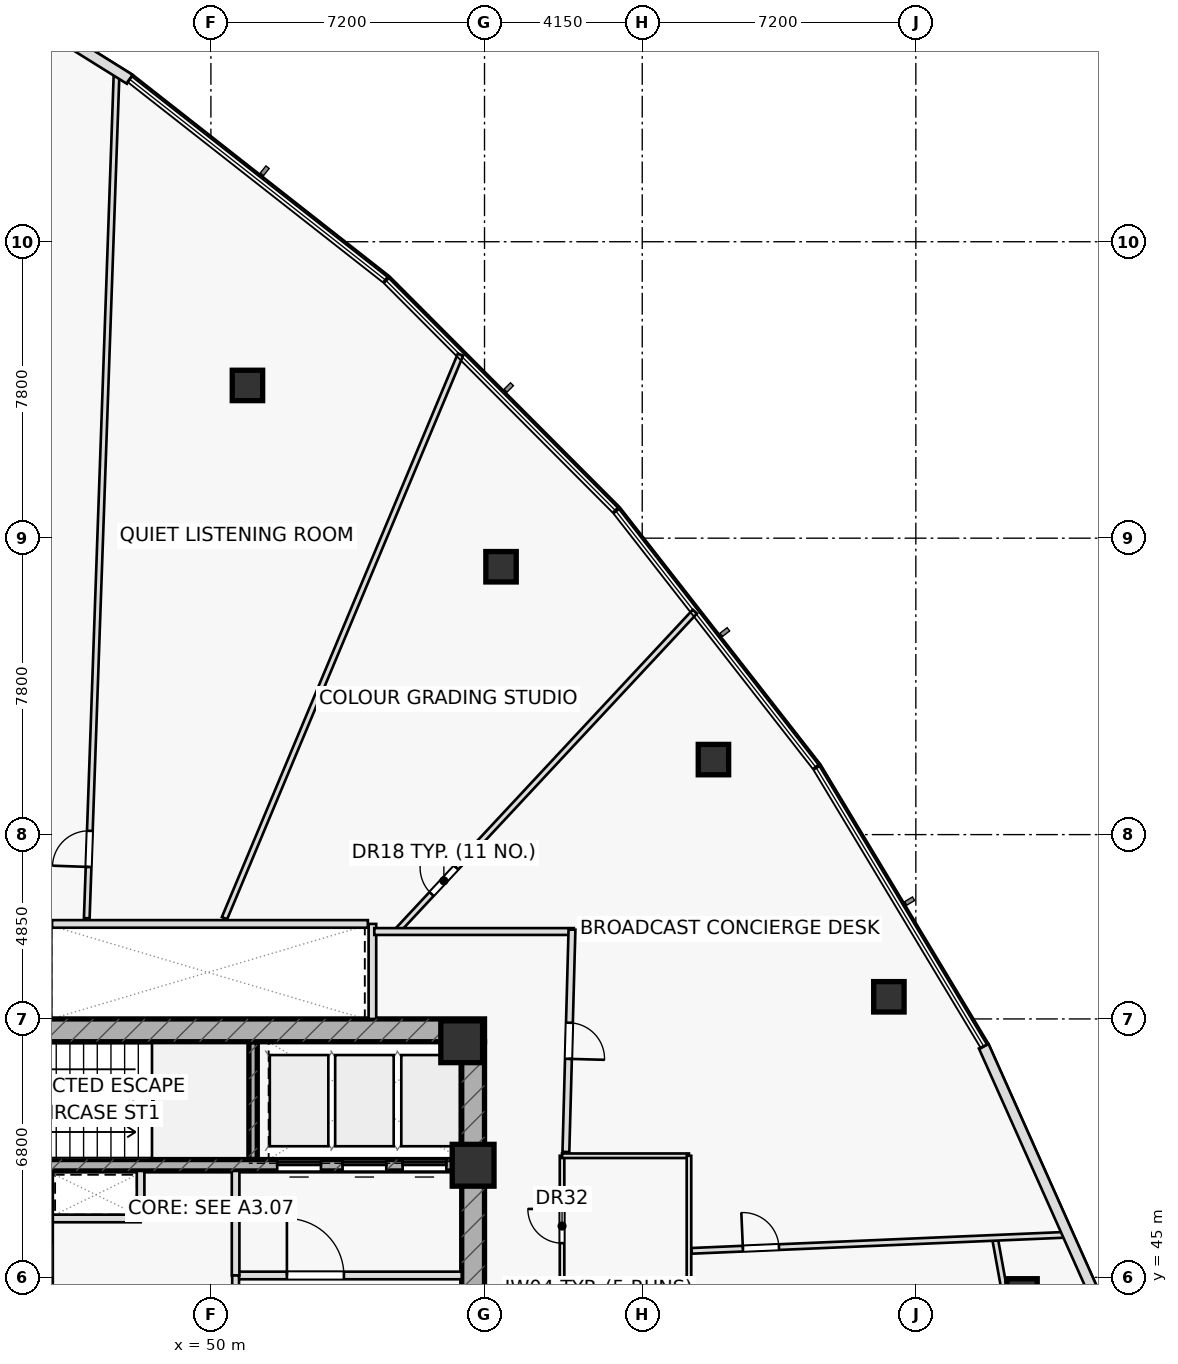
"""IFC4 building model, lengths in metres.
Left out: names, types, materials, properties, quantities, classifications, styles, units other than length and angle.
Written with IfcOpenShell. Run it as: python <this file> out.ifc"""

import sys

from ifc_helpers import new_model, si_unit, direction, frame, frame_2d, origin, origin_2d, place, context, subcontext, project, spatial, rectangle, hollow_rectangle, extrude, element, fill, save


model = new_model("IFC4")
c1 = context("Model", 3, precision=1e-05, world=origin(), true_north=direction((0.0, 1.0)))
c2 = subcontext(c1, "Body", "Model", "MODEL_VIEW")
j1 = project(units=[si_unit("LENGTHUNIT", "METRE"), si_unit("PLANEANGLEUNIT", "RADIAN")], contexts=[c1])
p1 = place(None, origin())
s1 = spatial("IfcSite", under=j1, at=p1, CompositionType="ELEMENT")
p2 = place(p1, origin())
s2 = spatial("IfcBuilding", under=s1, at=p2, CompositionType="ELEMENT")
p3 = place(p2, frame((0.0, 0.0, 43.2)))
s3 = spatial("IfcBuildingStorey", under=s2, at=p3, CompositionType="ELEMENT", Elevation=43.2)
p4 = place(p3, frame((51.11, 48.1, 0.0), z_axis=(0.0, 0.0, 1.0), x_axis=(0.0, 1.0, 0.0)))
e1 = element("IfcWall", 1, at=p4, inside=s3, PredefinedType="SHEAR", context=c2, shape_type="SweptSolid", body=[
    extrude(rectangle(XDim=3.1, YDim=0.22, at=frame_2d((1.55, 0.0))), origin(), (0.0, 0.0, 1.0), 3.6),
])
p5 = place(p3, frame((42.8, 51.5, 0.0), z_axis=(0.0, 0.0, 1.0), x_axis=(1.0, 0.0, 0.0)))
e2 = element("IfcWall", 2, at=p5, inside=s3, PredefinedType="SHEAR", context=c2, shape_type="SweptSolid", body=[
    extrude(rectangle(XDim=14.4, YDim=0.6, at=frame_2d((7.2, 0.0))), origin(), (0.0, 0.0, 1.0), 3.6),
])
p6 = place(p5, frame((0.88, 0.0, 0.0)))
e3 = element("IfcOpeningElement", 3, at=p6, cuts=e2, PredefinedType="OPENING", context=c2, shape_type="SweptSolid", body=[
    extrude(rectangle(XDim=1.05, YDim=2.2, at=frame_2d((0.525, 1.1))), frame((0.0, 0.31, 0.0), z_axis=(0.0, -1.0, 0.0), x_axis=(1.0, 0.0, 0.0)), (0.0, 0.0, 1.0), 0.62),
])
p7 = place(p3, frame((56.9, 38.8, 0.0), z_axis=(0.0, 0.0, 1.0), x_axis=(0.0, 1.0, 0.0)))
e4 = element("IfcWall", 4, at=p7, inside=s3, PredefinedType="SHEAR", context=c2, shape_type="SweptSolid", body=[
    extrude(rectangle(XDim=12.4, YDim=0.6, at=frame_2d((6.2, 0.0))), origin(), (0.0, 0.0, 1.0), 3.6),
])
p8 = place(p7, frame((3.85, 0.0, 0.0)))
e5 = element("IfcOpeningElement", 5, at=p8, cuts=e4, PredefinedType="OPENING", context=c2, shape_type="SweptSolid", body=[
    extrude(rectangle(XDim=1.5, YDim=2.2, at=frame_2d((0.75, 1.1))), frame((0.0, 0.31, 0.0), z_axis=(0.0, -1.0, 0.0), x_axis=(1.0, 0.0, 0.0)), (0.0, 0.0, 1.0), 0.62),
])
p9 = place(p3, frame((43.4, 47.95, 0.0), z_axis=(0.0, 0.0, 1.0), x_axis=(1.0, 0.0, 0.0)))
e6 = element("IfcWall", 6, at=p9, inside=s3, PredefinedType="SHEAR", context=c2, shape_type="SweptSolid", body=[
    extrude(rectangle(XDim=13.2, YDim=0.3, at=frame_2d((6.6, 0.0))), origin(), (0.0, 0.0, 1.0), 3.6),
])
p10 = place(p9, frame((8.345, 0.0, 0.0)))
e7 = element("IfcOpeningElement", 7, at=p10, cuts=e6, PredefinedType="OPENING", context=c2, shape_type="SweptSolid", body=[
    extrude(rectangle(XDim=1.15, YDim=2.2, at=frame_2d((0.575, 1.1))), frame((0.0, 0.16, 0.0), z_axis=(0.0, -1.0, 0.0), x_axis=(1.0, 0.0, 0.0)), (0.0, 0.0, 1.0), 0.32),
])
p11 = place(p9, frame((10.065, 0.0, 0.0)))
e8 = element("IfcOpeningElement", 8, at=p11, cuts=e6, PredefinedType="OPENING", context=c2, shape_type="SweptSolid", body=[
    extrude(rectangle(XDim=1.15, YDim=2.2, at=frame_2d((0.575, 1.1))), frame((0.0, 0.16, 0.0), z_axis=(0.0, -1.0, 0.0), x_axis=(1.0, 0.0, 0.0)), (0.0, 0.0, 1.0), 0.32),
])
p12 = place(p9, frame((11.645, 0.0, 0.0)))
e9 = element("IfcOpeningElement", 9, at=p12, cuts=e6, PredefinedType="OPENING", context=c2, shape_type="SweptSolid", body=[
    extrude(rectangle(XDim=1.15, YDim=2.2, at=frame_2d((0.575, 1.1))), frame((0.0, 0.16, 0.0), z_axis=(0.0, -1.0, 0.0), x_axis=(1.0, 0.0, 0.0)), (0.0, 0.0, 1.0), 0.32),
])
for number, where, z_axis, x_axis in (
    (10, (56.9, 47.95, 0.0), (0.0, 0.0, 1.0), (1.0, 0.0, 0.0)),
    (11, (56.6, 51.2, 0.0), (0.0, 0.0, 1.0), (1.0, 0.0, 0.0)),
):
    element("IfcColumn", number, at=place(p3, frame(where, z_axis=z_axis, x_axis=x_axis)), inside=s3, PredefinedType="COLUMN", context=c2, shape_type="SweptSolid", body=[
        extrude(rectangle(XDim=1.1, YDim=1.1, at=origin_2d()), origin(), (0.0, 0.0, 1.0), 3.6),
    ])
for number, where, z_axis, x_axis in (
    (12, (71.344, 44.565, 0.0), (0.0, 0.0, 1.0), (1.0, 0.0, 0.0)),
    (13, (67.841, 52.383, 0.0), (0.0, 0.0, 1.0), (1.0, 0.0, 0.0)),
    (14, (63.224, 58.624, 0.0), (0.0, 0.0, 1.0), (1.0, 0.0, 0.0)),
    (15, (57.635, 63.698, 0.0), (0.0, 0.0, 1.0), (1.0, 0.0, 0.0)),
    (16, (50.962, 68.469, 0.0), (0.0, 0.0, 1.0), (1.0, 0.0, 0.0)),
):
    element("IfcColumn", number, at=place(p3, frame(where, z_axis=z_axis, x_axis=x_axis)), inside=s3, PredefinedType="COLUMN", context=c2, shape_type="SweptSolid", body=[
        extrude(hollow_rectangle(XDim=0.8, YDim=0.8, WallThickness=0.045, at=origin_2d()), origin(), (0.0, 0.0, 1.0), 3.6),
    ])
p13 = place(p3, frame((54.25, 51.8, 0.0), z_axis=(0.0, 0.0, 1.0), x_axis=(0.0, 1.0, 0.0)))
e17 = element("IfcWall", 17, at=p13, inside=s3, PredefinedType="PARTITIONING", context=c2, shape_type="SweptSolid", body=[
    extrude(rectangle(XDim=2.5, YDim=0.2, at=frame_2d((1.25, 0.0))), origin(), (0.0, 0.0, 1.0), 3.6),
])
p14 = place(p3, frame((45.75, 46.55, 0.0), z_axis=(0.0, 0.0, 1.0), x_axis=(1.0, 0.0, 0.0)))
e18 = element("IfcWall", 18, at=p14, inside=s3, PredefinedType="PARTITIONING", context=c2, shape_type="SweptSolid", body=[
    extrude(rectangle(XDim=2.4, YDim=0.2, at=frame_2d((1.2, 0.0))), origin(), (0.0, 0.0, 1.0), 3.6),
])
p15 = place(p3, frame((48.15, 46.55, 0.0), z_axis=(0.0, 0.0, 1.0), x_axis=(0.0, 1.0, 0.0)))
e19 = element("IfcWall", 19, at=p15, inside=s3, PredefinedType="PARTITIONING", context=c2, shape_type="SweptSolid", body=[
    extrude(rectangle(XDim=1.25, YDim=0.2, at=frame_2d((0.625, 0.0))), origin(), (0.0, 0.0, 1.0), 3.6),
])
p16 = place(p3, frame((50.65, 45.05, 0.0), z_axis=(0.0, 0.0, 1.0), x_axis=(1.0, 0.0, 0.0)))
e20 = element("IfcWall", 20, at=p16, inside=s3, PredefinedType="PARTITIONING", context=c2, shape_type="SweptSolid", body=[
    extrude(rectangle(XDim=5.95, YDim=0.2, at=frame_2d((2.975, 0.0))), origin(), (0.0, 0.0, 1.0), 3.6),
])
p17 = place(p16, frame((1.35, 0.0, 0.0)))
e21 = element("IfcOpeningElement", 21, at=p17, cuts=e20, PredefinedType="OPENING", context=c2, shape_type="SweptSolid", body=[
    extrude(rectangle(XDim=1.5, YDim=2.2, at=frame_2d((0.75, 1.1))), frame((0.0, 0.11, 0.0), z_axis=(0.0, -1.0, 0.0), x_axis=(1.0, 0.0, 0.0)), (0.0, 0.0, 1.0), 0.22),
])
p18 = place(p3, frame((50.65, 45.05, 0.0), z_axis=(0.0, 0.0, 1.0), x_axis=(0.0, 1.0, 0.0)))
e22 = element("IfcWall", 22, at=p18, inside=s3, PredefinedType="PARTITIONING", context=c2, shape_type="SweptSolid", body=[
    extrude(rectangle(XDim=2.75, YDim=0.2, at=frame_2d((1.375, 0.0))), origin(), (0.0, 0.0, 1.0), 3.6),
])
p19 = place(p3, frame((50.65, 42.2, 0.0), z_axis=(0.0, 0.0, 1.0), x_axis=(0.0, 1.0, 0.0)))
e23 = element("IfcWall", 23, at=p19, inside=s3, PredefinedType="PARTITIONING", context=c2, shape_type="SweptSolid", body=[
    extrude(rectangle(XDim=2.85, YDim=0.18, at=frame_2d((1.425, 0.0))), origin(), (0.0, 0.0, 1.0), 3.6),
])
p20 = place(p19, frame((0.45, 0.0, 0.0)))
e24 = element("IfcOpeningElement", 24, at=p20, cuts=e23, PredefinedType="OPENING", context=c2, shape_type="SweptSolid", body=[
    extrude(rectangle(XDim=1.5, YDim=2.2, at=frame_2d((0.75, 1.1))), frame((0.0, 0.1, 0.0), z_axis=(0.0, -1.0, 0.0), x_axis=(1.0, 0.0, 0.0)), (0.0, 0.0, 1.0), 0.2),
])
p21 = place(p3, frame((45.75, 42.2, 0.0), z_axis=(0.0, 0.0, 1.0), x_axis=(0.0, 1.0, 0.0)))
e25 = element("IfcWall", 25, at=p21, inside=s3, PredefinedType="PARTITIONING", context=c2, shape_type="SweptSolid", body=[
    extrude(rectangle(XDim=5.6, YDim=0.18, at=frame_2d((2.8, 0.0))), origin(), (0.0, 0.0, 1.0), 3.6),
])
p22 = place(p21, frame((0.42, 0.0, 0.0)))
e26 = element("IfcOpeningElement", 26, at=p22, cuts=e25, PredefinedType="OPENING", context=c2, shape_type="SweptSolid", body=[
    extrude(rectangle(XDim=0.85, YDim=2.05, at=frame_2d((0.425, 1.025))), frame((0.0, 0.1, 0.0), z_axis=(0.0, -1.0, 0.0), x_axis=(1.0, 0.0, 0.0)), (0.0, 0.0, 1.0), 0.2),
])
p23 = place(p21, frame((1.57, 0.0, 0.0)))
e27 = element("IfcOpeningElement", 27, at=p23, cuts=e25, PredefinedType="OPENING", context=c2, shape_type="SweptSolid", body=[
    extrude(rectangle(XDim=0.85, YDim=2.05, at=frame_2d((0.425, 1.025))), frame((0.0, 0.1, 0.0), z_axis=(0.0, -1.0, 0.0), x_axis=(1.0, 0.0, 0.0)), (0.0, 0.0, 1.0), 0.2),
])
p24 = place(p21, frame((2.8, 0.0, 0.0)))
e28 = element("IfcOpeningElement", 28, at=p24, cuts=e25, PredefinedType="OPENING", context=c2, shape_type="SweptSolid", body=[
    extrude(rectangle(XDim=0.9, YDim=2.05, at=frame_2d((0.45, 1.025))), frame((0.0, 0.1, 0.0), z_axis=(0.0, -1.0, 0.0), x_axis=(1.0, 0.0, 0.0)), (0.0, 0.0, 1.0), 0.2),
])
p25 = place(p3, frame((72.969, 33.091, 0.0), z_axis=(0.0, 0.0, 1.0), x_axis=(-0.177742578179, 0.984077017261, 0.0)))
e29 = element("IfcWall", 29, at=p25, inside=s3, PredefinedType="PARTITIONING", context=c2, shape_type="SweptSolid", body=[
    extrude(rectangle(XDim=13.179, YDim=0.15, at=frame_2d((6.59, 0.0))), origin(), (0.0, 0.0, 1.0), 2.925),
])
p26 = place(p3, frame((59.24, 41.2, 0.0), z_axis=(0.0, 0.0, 1.0), x_axis=(0.0, 1.0, 0.0)))
e30 = element("IfcWall", 30, at=p26, inside=s3, PredefinedType="PARTITIONING", context=c2, shape_type="SweptSolid", body=[
    extrude(rectangle(XDim=7.0, YDim=0.12, at=frame_2d((3.5, 0.0))), origin(), (0.0, 0.0, 1.0), 3.6),
])
p27 = place(p26, frame((1.15, 0.0, 0.0)))
e31 = element("IfcOpeningElement", 31, at=p27, cuts=e30, PredefinedType="OPENING", context=c2, shape_type="SweptSolid", body=[
    extrude(rectangle(XDim=0.9, YDim=2.05, at=frame_2d((0.45, 1.025))), frame((0.0, 0.07, 0.0), z_axis=(0.0, -1.0, 0.0), x_axis=(1.0, 0.0, 0.0)), (0.0, 0.0, 1.0), 0.14),
])
p28 = place(p26, frame((4.7, 0.0, 0.0)))
e32 = element("IfcOpeningElement", 32, at=p28, cuts=e30, PredefinedType="OPENING", context=c2, shape_type="SweptSolid", body=[
    extrude(rectangle(XDim=0.9, YDim=2.05, at=frame_2d((0.45, 1.025))), frame((0.0, 0.07, 0.0), z_axis=(0.0, -1.0, 0.0), x_axis=(1.0, 0.0, 0.0)), (0.0, 0.0, 1.0), 0.14),
])
p29 = place(p3, frame((59.24, 48.2, 0.0), z_axis=(0.0, 0.0, 1.0), x_axis=(1.0, 0.0, 0.0)))
e33 = element("IfcWall", 33, at=p29, inside=s3, PredefinedType="PARTITIONING", context=c2, shape_type="SweptSolid", body=[
    extrude(rectangle(XDim=3.34, YDim=0.12, at=frame_2d((1.67, 0.0))), origin(), (0.0, 0.0, 1.0), 3.6),
])
p30 = place(p3, frame((62.58, 41.2, 0.0), z_axis=(0.0, 0.0, 1.0), x_axis=(0.0, 1.0, 0.0)))
e34 = element("IfcWall", 34, at=p30, inside=s3, PredefinedType="PARTITIONING", context=c2, shape_type="SweptSolid", body=[
    extrude(rectangle(XDim=7.0, YDim=0.12, at=frame_2d((3.5, 0.0))), origin(), (0.0, 0.0, 1.0), 3.6),
])
p31 = place(p3, frame((54.886, 54.1, 0.0), z_axis=(0.0, 0.0, 1.0), x_axis=(0.682006045628, 0.731346534638, 0.0)))
e35 = element("IfcWall", 35, at=p31, inside=s3, PredefinedType="PARTITIONING", context=c2, shape_type="SweptSolid", body=[
    extrude(rectangle(XDim=11.509, YDim=0.15, at=frame_2d((5.755, 0.0))), origin(), (0.0, 0.0, 1.0), 2.925),
])
p32 = place(p31, frame((1.35, 0.0, 0.0)))
e36 = element("IfcOpeningElement", 36, at=p32, cuts=e35, PredefinedType="OPENING", context=c2, shape_type="SweptSolid", body=[
    extrude(rectangle(XDim=0.95, YDim=2.05, at=frame_2d((0.475, 1.025))), frame((0.0, 0.085, 0.0), z_axis=(0.0, -1.0, 0.0), x_axis=(1.0, 0.0, 0.0)), (0.0, 0.0, 1.0), 0.17),
])
p33 = place(p3, frame((50.357, 54.45, 0.0), z_axis=(0.0, 0.0, 1.0), x_axis=(0.386255878412, 0.922391671901, 0.0)))
e37 = element("IfcWall", 37, at=p33, inside=s3, PredefinedType="PARTITIONING", context=c2, shape_type="SweptSolid", body=[
    extrude(rectangle(XDim=16.077, YDim=0.15, at=frame_2d((8.039, 0.0))), origin(), (0.0, 0.0, 1.0), 2.925),
])
p34 = place(p3, frame((46.733, 54.45, 0.0), z_axis=(0.0, 0.0, 1.0), x_axis=(0.035284497106, 0.999377308259, 0.0)))
e38 = element("IfcWall", 38, at=p34, inside=s3, PredefinedType="PARTITIONING", context=c2, shape_type="SweptSolid", body=[
    extrude(rectangle(XDim=22.314, YDim=0.15, at=frame_2d((11.157, 0.0))), origin(), (0.0, 0.0, 1.0), 2.975),
])
p35 = place(p34, frame((1.35, 0.0, 0.0)))
e39 = element("IfcOpeningElement", 39, at=p35, cuts=e38, PredefinedType="OPENING", context=c2, shape_type="SweptSolid", body=[
    extrude(rectangle(XDim=0.95, YDim=2.05, at=frame_2d((0.475, 1.025))), frame((0.0, 0.085, 0.0), z_axis=(0.0, -1.0, 0.0), x_axis=(1.0, 0.0, 0.0)), (0.0, 0.0, 1.0), 0.17),
])
p36 = place(p3, frame((62.65, 45.698, 0.0), z_axis=(0.0, 0.0, 1.0), x_axis=(0.999078725553, 0.042915034048, 0.0)))
e40 = element("IfcWall", 40, at=p36, inside=s3, PredefinedType="PARTITIONING", context=c2, shape_type="SweptSolid", body=[
    extrude(rectangle(XDim=9.921, YDim=0.15, at=frame_2d((4.961, 0.0))), origin(), (0.0, 0.0, 1.0), 2.975),
])
p37 = place(p36, frame((1.35, 0.0, 0.0)))
e41 = element("IfcOpeningElement", 41, at=p37, cuts=e40, PredefinedType="OPENING", context=c2, shape_type="SweptSolid", body=[
    extrude(rectangle(XDim=0.95, YDim=2.05, at=frame_2d((0.475, 1.025))), frame((0.0, 0.085, 0.0), z_axis=(0.0, -1.0, 0.0), x_axis=(1.0, 0.0, 0.0)), (0.0, 0.0, 1.0), 0.17),
])
p38 = place(p3, frame((54.3, 54.1, 0.0), z_axis=(0.0, 0.0, 1.0), x_axis=(1.0, 0.0, 0.0)))
e42 = element("IfcWall", 42, at=p38, inside=s3, PredefinedType="PARTITIONING", context=c2, shape_type="SweptSolid", body=[
    extrude(rectangle(XDim=5.25, YDim=0.18, at=frame_2d((2.625, 0.0))), origin(), (0.0, 0.0, 1.0), 2.925),
])
p39 = place(p3, frame((59.501, 54.15, 0.0), z_axis=(0.0, 0.0, 1.0), x_axis=(-0.027367567602, -0.999625437973, 0.0)))
e43 = element("IfcWall", 43, at=p39, inside=s3, PredefinedType="PARTITIONING", context=c2, shape_type="SweptSolid", body=[
    extrude(rectangle(XDim=5.852, YDim=0.18, at=frame_2d((2.926, 0.0))), origin(), (0.0, 0.0, 1.0), 2.925),
])
p40 = place(p39, frame((2.451, 0.0, 0.0)))
e44 = element("IfcOpeningElement", 44, at=p40, cuts=e43, PredefinedType="OPENING", context=c2, shape_type="SweptSolid", body=[
    extrude(rectangle(XDim=0.95, YDim=2.05, at=frame_2d((0.475, 1.025))), frame((0.0, 0.1, 0.0), z_axis=(0.0, -1.0, 0.0), x_axis=(1.0, 0.0, 0.0)), (0.0, 0.0, 1.0), 0.2),
])
p41 = place(p3, frame((47.864, 76.524, 0.0), z_axis=(0.0, 0.0, 1.0), x_axis=(-0.848494667363, 0.529203929934, 0.0)))
e45 = element("IfcWall", 45, at=p41, inside=s3, PredefinedType="STANDARD", context=c2, shape_type="SweptSolid", body=[
    extrude(rectangle(XDim=2.237, YDim=0.28, at=frame_2d((1.118, 0.0))), origin(), (0.0, 0.0, 1.0), 3.6),
])
p42 = place(p3, frame((73.839, 43.24, 0.0), z_axis=(0.0, 0.0, 1.0), x_axis=(-0.407915855492, 0.91301952599, 0.0)))
e46 = element("IfcWall", 46, at=p42, inside=s3, PredefinedType="STANDARD", context=c2, shape_type="SweptSolid", body=[
    extrude(rectangle(XDim=8.586, YDim=0.28, at=frame_2d((4.293, 0.0))), origin(), (0.0, 0.0, 1.0), 3.6),
])
p43 = place(p3, frame((45.82, 54.3, 0.0), z_axis=(0.0, 0.0, 1.0), x_axis=(1.0, 0.0, 0.0)))
e47 = element("IfcWall", 47, at=p43, inside=s3, PredefinedType="PARTITIONING", context=c2, shape_type="SweptSolid", body=[
    extrude(rectangle(XDim=8.31, YDim=0.2, at=frame_2d((4.155, 0.0))), origin(), (0.0, 0.0, 1.0), 3.6),
])
p44 = place(p17, origin())
e48 = element("IfcDoor", 48, at=p44, inside=s3, OperationType="SINGLE_SWING_LEFT", PredefinedType="DOOR", context=c2, shape_type="SweptSolid", body=[
    extrude(rectangle(XDim=1.5, YDim=2.2, at=frame_2d((0.75, 1.1))), frame((0.0, 0.025, 0.0), z_axis=(0.0, -1.0, 0.0), x_axis=(1.0, 0.0, 0.0)), (0.0, 0.0, 1.0), 0.05),
])
fill(e21, e48)
p45 = place(p28, origin())
e49 = element("IfcDoor", 49, at=p45, inside=s3, OperationType="SINGLE_SWING_RIGHT", PredefinedType="DOOR", context=c2, shape_type="SweptSolid", body=[
    extrude(rectangle(XDim=0.9, YDim=2.05, at=frame_2d((0.45, 1.025))), frame((0.0, 0.025, 0.0), z_axis=(0.0, -1.0, 0.0), x_axis=(1.0, 0.0, 0.0)), (0.0, 0.0, 1.0), 0.05),
])
fill(e32, e49)
p46 = place(p32, origin())
e50 = element("IfcDoor", 50, at=p46, inside=s3, OperationType="SINGLE_SWING_RIGHT", PredefinedType="DOOR", context=c2, shape_type="SweptSolid", body=[
    extrude(rectangle(XDim=0.95, YDim=2.05, at=frame_2d((0.475, 1.025))), frame((0.0, 0.025, 0.0), z_axis=(0.0, -1.0, 0.0), x_axis=(1.0, 0.0, 0.0)), (0.0, 0.0, 1.0), 0.05),
])
fill(e36, e50)
p47 = place(p35, origin())
e51 = element("IfcDoor", 51, at=p47, inside=s3, OperationType="SINGLE_SWING_LEFT", PredefinedType="DOOR", context=c2, shape_type="SweptSolid", body=[
    extrude(rectangle(XDim=0.95, YDim=2.05, at=frame_2d((0.475, 1.025))), frame((0.0, 0.025, 0.0), z_axis=(0.0, -1.0, 0.0), x_axis=(1.0, 0.0, 0.0)), (0.0, 0.0, 1.0), 0.05),
])
fill(e39, e51)
p48 = place(p37, origin())
e52 = element("IfcDoor", 52, at=p48, inside=s3, OperationType="SINGLE_SWING_LEFT", PredefinedType="DOOR", context=c2, shape_type="SweptSolid", body=[
    extrude(rectangle(XDim=0.95, YDim=2.05, at=frame_2d((0.475, 1.025))), frame((0.0, 0.025, 0.0), z_axis=(0.0, -1.0, 0.0), x_axis=(1.0, 0.0, 0.0)), (0.0, 0.0, 1.0), 0.05),
])
fill(e41, e52)
p49 = place(p40, origin())
e53 = element("IfcDoor", 53, at=p49, inside=s3, OperationType="SINGLE_SWING_RIGHT", PredefinedType="DOOR", context=c2, shape_type="SweptSolid", body=[
    extrude(rectangle(XDim=0.95, YDim=2.05, at=frame_2d((0.475, 1.025))), frame((0.0, 0.025, 0.0), z_axis=(0.0, -1.0, 0.0), x_axis=(1.0, 0.0, 0.0)), (0.0, 0.0, 1.0), 0.05),
])
fill(e44, e53)
p50 = place(p10, origin())
e54 = element("IfcDoor", 54, at=p50, inside=s3, OperationType="SLIDING_TO_LEFT", PredefinedType="DOOR", context=c2, shape_type="SweptSolid", body=[
    extrude(rectangle(XDim=1.15, YDim=2.2, at=frame_2d((0.575, 1.1))), frame((0.0, 0.025, 0.0), z_axis=(0.0, -1.0, 0.0), x_axis=(1.0, 0.0, 0.0)), (0.0, 0.0, 1.0), 0.05),
])
fill(e7, e54)
p51 = place(p11, origin())
e55 = element("IfcDoor", 55, at=p51, inside=s3, OperationType="SLIDING_TO_LEFT", PredefinedType="DOOR", context=c2, shape_type="SweptSolid", body=[
    extrude(rectangle(XDim=1.15, YDim=2.2, at=frame_2d((0.575, 1.1))), frame((0.0, 0.025, 0.0), z_axis=(0.0, -1.0, 0.0), x_axis=(1.0, 0.0, 0.0)), (0.0, 0.0, 1.0), 0.05),
])
fill(e8, e55)
p52 = place(p12, origin())
e56 = element("IfcDoor", 56, at=p52, inside=s3, OperationType="SLIDING_TO_LEFT", PredefinedType="DOOR", context=c2, shape_type="SweptSolid", body=[
    extrude(rectangle(XDim=1.15, YDim=2.2, at=frame_2d((0.575, 1.1))), frame((0.0, 0.025, 0.0), z_axis=(0.0, -1.0, 0.0), x_axis=(1.0, 0.0, 0.0)), (0.0, 0.0, 1.0), 0.05),
])
fill(e9, e56)
save(model, sys.argv[1])
